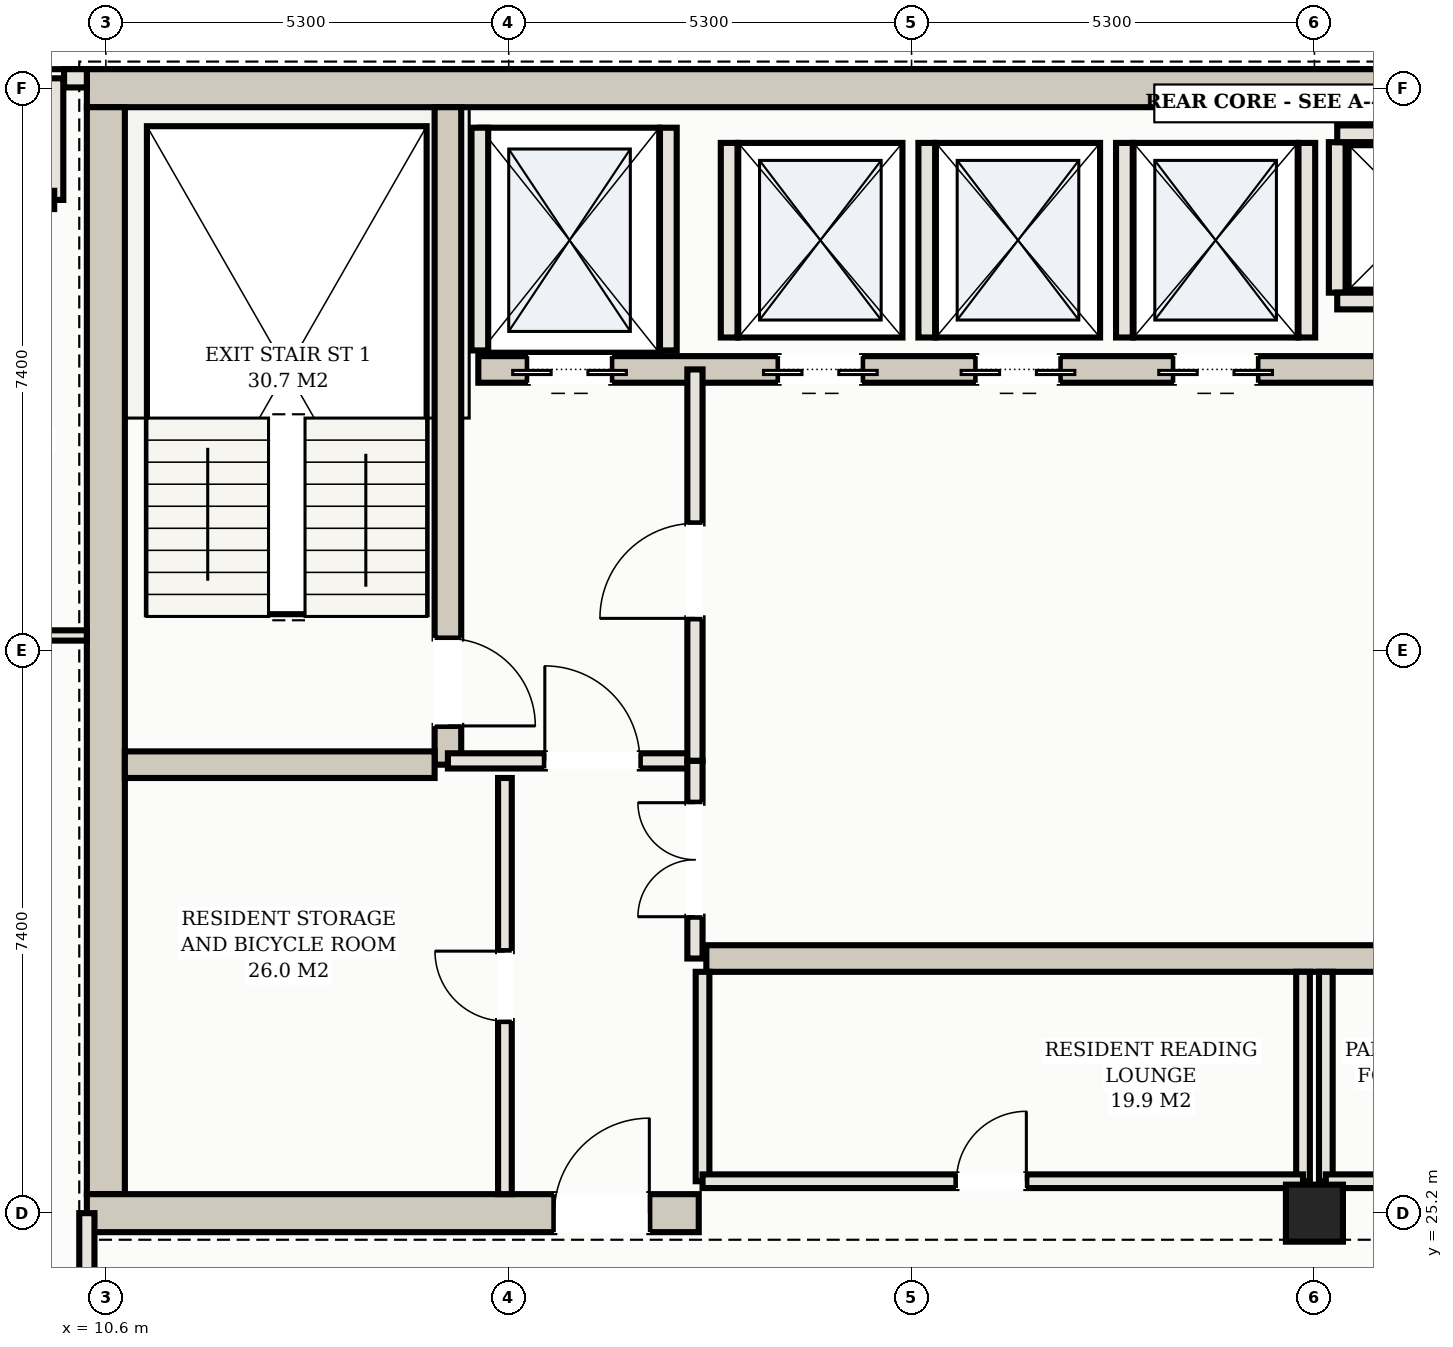
"""IFC4 building model, lengths in metres.
Left out: names, types, materials, properties, quantities, classifications, styles, units other than length and angle.
Written with IfcOpenShell. Run it as: python <this file> out.ifc"""

import sys

from ifc_helpers import new_model, si_unit, direction, frame, frame_2d, origin, origin_2d, place, context, subcontext, project, spatial, rectangle, hollow_rectangle, extrude, element, fill, save


model = new_model("IFC4")
c1 = context("Model", 3, precision=1e-05, world=origin(), true_north=direction((0.0, 1.0)))
c2 = subcontext(c1, "Body", "Model", "MODEL_VIEW")
j1 = project(units=[si_unit("LENGTHUNIT", "METRE"), si_unit("PLANEANGLEUNIT", "RADIAN")], contexts=[c1])
p1 = place(None, origin())
s1 = spatial("IfcSite", under=j1, at=p1, CompositionType="ELEMENT")
p2 = place(p1, origin())
s2 = spatial("IfcBuilding", under=s1, at=p2, CompositionType="ELEMENT")
p3 = place(p2, frame((0.0, 0.0, 223.1)))
s3 = spatial("IfcBuildingStorey", under=s2, at=p3, CompositionType="ELEMENT", Elevation=223.1)
p4 = place(p3, frame((10.35, 40.0, 0.0), z_axis=(0.0, 0.0, 1.0), x_axis=(1.0, 0.0, 0.0)))
e1 = element("IfcWall", 1, at=p4, inside=s3, PredefinedType="SHEAR", context=c2, shape_type="SweptSolid", body=[
    extrude(rectangle(XDim=32.3, YDim=0.5, at=frame_2d((16.15, 0.0))), origin(), (0.0, 0.0, 1.0), 3.11),
])
p5 = place(p3, frame((10.6, 25.45, 0.0), z_axis=(0.0, 0.0, 1.0), x_axis=(0.0, 1.0, 0.0)))
e2 = element("IfcWall", 2, at=p5, inside=s3, PredefinedType="SHEAR", context=c2, shape_type="SweptSolid", body=[
    extrude(rectangle(XDim=14.3, YDim=0.5, at=frame_2d((7.15, 0.0))), origin(), (0.0, 0.0, 1.0), 3.11),
])
p6 = place(p3, frame((10.35, 25.2, 0.0), z_axis=(0.0, 0.0, 1.0), x_axis=(1.0, 0.0, 0.0)))
e3 = element("IfcWall", 3, at=p6, inside=s3, PredefinedType="SHEAR", context=c2, shape_type="SweptSolid", body=[
    extrude(rectangle(XDim=8.05, YDim=0.5, at=frame_2d((4.025, 0.0))), origin(), (0.0, 0.0, 1.0), 3.11),
])
p7 = place(p6, frame((6.15, 0.0, 0.0)))
e4 = element("IfcOpeningElement", 4, at=p7, cuts=e3, PredefinedType="OPENING", context=c2, shape_type="SweptSolid", body=[
    extrude(rectangle(XDim=1.25, YDim=2.2, at=frame_2d((0.625, 1.1))), frame((0.0, 0.26, 0.0), z_axis=(0.0, -1.0, 0.0), x_axis=(1.0, 0.0, 0.0)), (0.0, 0.0, 1.0), 0.52),
])
p8 = place(p3, frame((15.1, 31.1, 0.0), z_axis=(0.0, 0.0, 1.0), x_axis=(0.0, 1.0, 0.0)))
e5 = element("IfcWall", 5, at=p8, inside=s3, PredefinedType="SHEAR", context=c2, shape_type="SweptSolid", body=[
    extrude(rectangle(XDim=8.65, YDim=0.35, at=frame_2d((4.325, 0.0))), origin(), (0.0, 0.0, 1.0), 3.11),
])
p9 = place(p8, frame((0.51, 0.0, 0.0)))
e6 = element("IfcOpeningElement", 6, at=p9, cuts=e5, PredefinedType="OPENING", context=c2, shape_type="SweptSolid", body=[
    extrude(rectangle(XDim=1.15, YDim=2.2, at=frame_2d((0.575, 1.1))), frame((0.0, 0.185, 0.0), z_axis=(0.0, -1.0, 0.0), x_axis=(1.0, 0.0, 0.0)), (0.0, 0.0, 1.0), 0.37),
])
p10 = place(p3, frame((10.85, 31.1, 0.0), z_axis=(0.0, 0.0, 1.0), x_axis=(1.0, 0.0, 0.0)))
e7 = element("IfcWall", 7, at=p10, inside=s3, PredefinedType="SHEAR", context=c2, shape_type="SweptSolid", body=[
    extrude(rectangle(XDim=4.075, YDim=0.35, at=frame_2d((2.038, 0.0))), origin(), (0.0, 0.0, 1.0), 3.11),
])
p11 = place(p3, frame((15.5, 36.3, 0.0), z_axis=(0.0, 0.0, 1.0), x_axis=(1.0, 0.0, 0.0)))
e8 = element("IfcWall", 8, at=p11, inside=s3, PredefinedType="SHEAR", context=c2, shape_type="SweptSolid", body=[
    extrude(rectangle(XDim=22.0, YDim=0.35, at=frame_2d((11.0, 0.0))), origin(), (0.0, 0.0, 1.0), 3.11),
])
p12 = place(p11, frame((0.65, 0.0, 0.0)))
e9 = element("IfcOpeningElement", 9, at=p12, cuts=e8, PredefinedType="OPENING", context=c2, shape_type="SweptSolid", body=[
    extrude(rectangle(XDim=1.1, YDim=2.15, at=frame_2d((0.55, 1.075))), frame((0.0, 0.185, 0.0), z_axis=(0.0, -1.0, 0.0), x_axis=(1.0, 0.0, 0.0)), (0.0, 0.0, 1.0), 0.37),
])
p13 = place(p11, frame((20.25, 0.0, 0.0)))
e10 = element("IfcOpeningElement", 10, at=p13, cuts=e8, PredefinedType="OPENING", context=c2, shape_type="SweptSolid", body=[
    extrude(rectangle(XDim=1.1, YDim=2.15, at=frame_2d((0.55, 1.075))), frame((0.0, 0.185, 0.0), z_axis=(0.0, -1.0, 0.0), x_axis=(1.0, 0.0, 0.0)), (0.0, 0.0, 1.0), 0.37),
])
p14 = place(p11, frame((17.05, 0.0, 0.0)))
e11 = element("IfcOpeningElement", 11, at=p14, cuts=e8, PredefinedType="OPENING", context=c2, shape_type="SweptSolid", body=[
    extrude(rectangle(XDim=1.3, YDim=2.2, at=frame_2d((0.65, 1.1))), frame((0.0, 0.185, 0.0), z_axis=(0.0, -1.0, 0.0), x_axis=(1.0, 0.0, 0.0)), (0.0, 0.0, 1.0), 0.37),
])
p15 = place(p11, frame((3.95, 0.0, 0.0)))
e12 = element("IfcOpeningElement", 12, at=p15, cuts=e8, PredefinedType="OPENING", context=c2, shape_type="SweptSolid", body=[
    extrude(rectangle(XDim=1.1, YDim=2.15, at=frame_2d((0.55, 1.075))), frame((0.0, 0.185, 0.0), z_axis=(0.0, -1.0, 0.0), x_axis=(1.0, 0.0, 0.0)), (0.0, 0.0, 1.0), 0.37),
])
p16 = place(p11, frame((6.55, 0.0, 0.0)))
e13 = element("IfcOpeningElement", 13, at=p16, cuts=e8, PredefinedType="OPENING", context=c2, shape_type="SweptSolid", body=[
    extrude(rectangle(XDim=1.1, YDim=2.15, at=frame_2d((0.55, 1.075))), frame((0.0, 0.185, 0.0), z_axis=(0.0, -1.0, 0.0), x_axis=(1.0, 0.0, 0.0)), (0.0, 0.0, 1.0), 0.37),
])
p17 = place(p11, frame((9.15, 0.0, 0.0)))
e14 = element("IfcOpeningElement", 14, at=p17, cuts=e8, PredefinedType="OPENING", context=c2, shape_type="SweptSolid", body=[
    extrude(rectangle(XDim=1.1, YDim=2.15, at=frame_2d((0.55, 1.075))), frame((0.0, 0.185, 0.0), z_axis=(0.0, -1.0, 0.0), x_axis=(1.0, 0.0, 0.0)), (0.0, 0.0, 1.0), 0.37),
])
p18 = place(p3, frame((18.5, 28.55, 0.0), z_axis=(0.0, 0.0, 1.0), x_axis=(1.0, 0.0, 0.0)))
e15 = element("IfcWall", 15, at=p18, inside=s3, PredefinedType="SHEAR", context=c2, shape_type="SweptSolid", body=[
    extrude(rectangle(XDim=16.0, YDim=0.35, at=frame_2d((8.0, 0.0))), origin(), (0.0, 0.0, 1.0), 3.11),
])
p19 = place(p3, frame((26.5, 25.2, 0.0), z_axis=(0.0, 0.0, 1.0), x_axis=(1.0, 0.0, 0.0)))
e16 = element("IfcColumn", 16, at=p19, inside=s3, PredefinedType="COLUMN", context=c2, shape_type="SweptSolid", body=[
    extrude(hollow_rectangle(XDim=0.75, YDim=0.75, WallThickness=0.025, at=origin_2d()), origin(), (0.0, 0.0, 1.0), 3.3),
])
for number, where, z_axis, x_axis in (
    (17, (15.52, 36.55, 0.0), (0.0, 0.0, 1.0), (0.0, 1.0, 0.0)),
    (18, (18.0, 36.55, 0.0), (0.0, 0.0, 1.0), (0.0, 1.0, 0.0)),
):
    element("IfcWall", number, at=place(p3, frame(where, z_axis=z_axis, x_axis=x_axis)), inside=s3, PredefinedType="SOLIDWALL", context=c2, shape_type="SweptSolid", body=[
        extrude(rectangle(XDim=2.93, YDim=0.22, at=frame_2d((1.465, 0.0))), origin(), (0.0, 0.0, 1.0), 3.11),
    ])
for number, where, z_axis, x_axis in (
    (19, (18.8, 36.72, 0.0), (0.0, 0.0, 1.0), (0.0, 1.0, 0.0)),
    (20, (21.4, 36.72, 0.0), (0.0, 0.0, 1.0), (0.0, 1.0, 0.0)),
    (21, (24.0, 36.72, 0.0), (0.0, 0.0, 1.0), (0.0, 1.0, 0.0)),
    (22, (26.4, 36.72, 0.0), (0.0, 0.0, 1.0), (0.0, 1.0, 0.0)),
):
    element("IfcWall", number, at=place(p3, frame(where, z_axis=z_axis, x_axis=x_axis)), inside=s3, PredefinedType="SOLIDWALL", context=c2, shape_type="SweptSolid", body=[
        extrude(rectangle(XDim=2.56, YDim=0.22, at=frame_2d((1.28, 0.0))), origin(), (0.0, 0.0, 1.0), 3.11),
    ])
p20 = place(p3, frame((26.8, 37.31, 0.0), z_axis=(0.0, 0.0, 1.0), x_axis=(0.0, 1.0, 0.0)))
e23 = element("IfcWall", 23, at=p20, inside=s3, PredefinedType="SOLIDWALL", context=c2, shape_type="SweptSolid", body=[
    extrude(rectangle(XDim=1.98, YDim=0.22, at=frame_2d((0.99, 0.0))), origin(), (0.0, 0.0, 1.0), 3.11),
])
for number, where, z_axis, x_axis in (
    (24, (26.8, 39.4, 0.0), (0.0, 0.0, 1.0), (1.0, 0.0, 0.0)),
    (25, (26.8, 37.2, 0.0), (0.0, 0.0, 1.0), (1.0, 0.0, 0.0)),
):
    element("IfcWall", number, at=place(p3, frame(where, z_axis=z_axis, x_axis=x_axis)), inside=s3, PredefinedType="SOLIDWALL", context=c2, shape_type="SweptSolid", body=[
        extrude(rectangle(XDim=2.2, YDim=0.22, at=frame_2d((1.1, 0.0))), origin(), (0.0, 0.0, 1.0), 3.11),
    ])
p21 = place(p3, frame((10.35, 40.13, 0.0), z_axis=(0.0, 0.0, 1.0), x_axis=(-1.0, 0.0, 0.0)))
e26 = element("IfcWall", 26, at=p21, inside=s3, PredefinedType="SOLIDWALL", context=c2, shape_type="SweptSolid", body=[
    extrude(rectangle(XDim=0.3, YDim=0.24, at=frame_2d((0.15, 0.0))), origin(), (0.0, 0.0, 1.0), 3.11),
])
for number, where, z_axis, x_axis in (
    (27, (9.92, 40.13, 0.0), (0.0, 0.0, 1.0), (0.0, -1.0, 0.0)),
    (28, (9.92, 38.53, 0.0), (0.0, 0.0, 1.0), (-1.0, 0.0, 0.0)),
):
    element("IfcWall", number, at=place(p3, frame(where, z_axis=z_axis, x_axis=x_axis)), inside=s3, PredefinedType="SOLIDWALL", context=c2, shape_type="SweptSolid", body=[
        extrude(rectangle(XDim=1.6, YDim=0.24, at=frame_2d((0.8, 0.0))), origin(), (0.0, 0.0, 1.0), 3.11),
    ])
p22 = place(p3, frame((15.1, 31.15, 0.0), z_axis=(0.0, 0.0, 1.0), x_axis=(1.0, 0.0, 0.0)))
e29 = element("IfcWall", 29, at=p22, inside=s3, PredefinedType="PARTITIONING", context=c2, shape_type="SweptSolid", body=[
    extrude(rectangle(XDim=3.25, YDim=0.2, at=frame_2d((1.625, 0.0))), origin(), (0.0, 0.0, 1.0), 2.43),
])
p23 = place(p22, frame((1.275, 0.0, 0.0)))
e30 = element("IfcOpeningElement", 30, at=p23, cuts=e29, PredefinedType="OPENING", context=c2, shape_type="SweptSolid", body=[
    extrude(rectangle(XDim=1.25, YDim=2.2, at=frame_2d((0.625, 1.1))), frame((0.0, 0.11, 0.0), z_axis=(0.0, -1.0, 0.0), x_axis=(1.0, 0.0, 0.0)), (0.0, 0.0, 1.0), 0.22),
])
p24 = place(p3, frame((18.35, 31.15, 0.0), z_axis=(0.0, 0.0, 1.0), x_axis=(0.0, 1.0, 0.0)))
e31 = element("IfcWall", 31, at=p24, inside=s3, PredefinedType="PARTITIONING", context=c2, shape_type="SweptSolid", body=[
    extrude(rectangle(XDim=5.15, YDim=0.2, at=frame_2d((2.575, 0.0))), origin(), (0.0, 0.0, 1.0), 2.43),
])
p25 = place(p24, frame((1.875, 0.0, 0.0)))
e32 = element("IfcOpeningElement", 32, at=p25, cuts=e31, PredefinedType="OPENING", context=c2, shape_type="SweptSolid", body=[
    extrude(rectangle(XDim=1.25, YDim=2.2, at=frame_2d((0.625, 1.1))), frame((0.0, 0.11, 0.0), z_axis=(0.0, -1.0, 0.0), x_axis=(1.0, 0.0, 0.0)), (0.0, 0.0, 1.0), 0.22),
])
p26 = place(p3, frame((15.85, 25.45, 0.0), z_axis=(0.0, 0.0, 1.0), x_axis=(0.0, 1.0, 0.0)))
e33 = element("IfcWall", 33, at=p26, inside=s3, PredefinedType="PARTITIONING", context=c2, shape_type="SweptSolid", body=[
    extrude(rectangle(XDim=5.475, YDim=0.18, at=frame_2d((2.738, 0.0))), origin(), (0.0, 0.0, 1.0), 2.43),
])
p27 = place(p26, frame((2.277, 0.0, 0.0)))
e34 = element("IfcOpeningElement", 34, at=p27, cuts=e33, PredefinedType="OPENING", context=c2, shape_type="SweptSolid", body=[
    extrude(rectangle(XDim=0.92, YDim=2.15, at=frame_2d((0.46, 1.075))), frame((0.0, 0.1, 0.0), z_axis=(0.0, -1.0, 0.0), x_axis=(1.0, 0.0, 0.0)), (0.0, 0.0, 1.0), 0.2),
])
p28 = place(p3, frame((18.35, 28.55, 0.0), z_axis=(0.0, 0.0, 1.0), x_axis=(0.0, 1.0, 0.0)))
e35 = element("IfcWall", 35, at=p28, inside=s3, PredefinedType="PARTITIONING", context=c2, shape_type="SweptSolid", body=[
    extrude(rectangle(XDim=2.6, YDim=0.2, at=frame_2d((1.3, 0.0))), origin(), (0.0, 0.0, 1.0), 2.43),
])
p29 = place(p28, frame((0.55, 0.0, 0.0)))
e36 = element("IfcOpeningElement", 36, at=p29, cuts=e35, PredefinedType="OPENING", context=c2, shape_type="SweptSolid", body=[
    extrude(rectangle(XDim=1.5, YDim=2.25, at=frame_2d((0.75, 1.125))), frame((0.0, 0.11, 0.0), z_axis=(0.0, -1.0, 0.0), x_axis=(1.0, 0.0, 0.0)), (0.0, 0.0, 1.0), 0.22),
])
for number, where, z_axis, x_axis in (
    (37, (18.45, 25.62, 0.0), (0.0, 0.0, 1.0), (0.0, 1.0, 0.0)),
    (38, (26.35, 25.62, 0.0), (0.0, 0.0, 1.0), (0.0, 1.0, 0.0)),
):
    element("IfcWall", number, at=place(p3, frame(where, z_axis=z_axis, x_axis=x_axis)), inside=s3, PredefinedType="PARTITIONING", context=c2, shape_type="SweptSolid", body=[
        extrude(rectangle(XDim=2.755, YDim=0.18, at=frame_2d((1.377, 0.0))), origin(), (0.0, 0.0, 1.0), 2.43),
    ])
p30 = place(p3, frame((18.45, 25.62, 0.0), z_axis=(0.0, 0.0, 1.0), x_axis=(1.0, 0.0, 0.0)))
e39 = element("IfcWall", 39, at=p30, inside=s3, PredefinedType="PARTITIONING", context=c2, shape_type="SweptSolid", body=[
    extrude(rectangle(XDim=7.9, YDim=0.18, at=frame_2d((3.95, 0.0))), origin(), (0.0, 0.0, 1.0), 2.43),
])
p31 = place(p30, frame((3.34, 0.0, 0.0)))
e40 = element("IfcOpeningElement", 40, at=p31, cuts=e39, PredefinedType="OPENING", context=c2, shape_type="SweptSolid", body=[
    extrude(rectangle(XDim=0.92, YDim=2.15, at=frame_2d((0.46, 1.075))), frame((0.0, 0.1, 0.0), z_axis=(0.0, -1.0, 0.0), x_axis=(1.0, 0.0, 0.0)), (0.0, 0.0, 1.0), 0.2),
])
p32 = place(p3, frame((26.65, 25.62, 0.0), z_axis=(0.0, 0.0, 1.0), x_axis=(0.0, 1.0, 0.0)))
e41 = element("IfcWall", 41, at=p32, inside=s3, PredefinedType="PARTITIONING", context=c2, shape_type="SweptSolid", body=[
    extrude(rectangle(XDim=2.755, YDim=0.18, at=frame_2d((1.377, 0.0))), origin(), (0.0, 0.0, 1.0), 2.43),
])
p33 = place(p3, frame((26.65, 25.62, 0.0), z_axis=(0.0, 0.0, 1.0), x_axis=(1.0, 0.0, 0.0)))
e42 = element("IfcWall", 42, at=p33, inside=s3, PredefinedType="PARTITIONING", context=c2, shape_type="SweptSolid", body=[
    extrude(rectangle(XDim=7.9, YDim=0.18, at=frame_2d((3.95, 0.0))), origin(), (0.0, 0.0, 1.0), 2.43),
])
p34 = place(p33, frame((3.34, 0.0, 0.0)))
e43 = element("IfcOpeningElement", 43, at=p34, cuts=e42, PredefinedType="OPENING", context=c2, shape_type="SweptSolid", body=[
    extrude(rectangle(XDim=0.92, YDim=2.15, at=frame_2d((0.46, 1.075))), frame((0.0, 0.1, 0.0), z_axis=(0.0, -1.0, 0.0), x_axis=(1.0, 0.0, 0.0)), (0.0, 0.0, 1.0), 0.2),
])
p35 = place(p3, frame((10.35, 23.75, 0.0), z_axis=(0.0, 0.0, 1.0), x_axis=(0.0, 1.0, 0.0)))
e44 = element("IfcWall", 44, at=p35, inside=s3, PredefinedType="PARTITIONING", context=c2, shape_type="SweptSolid", body=[
    extrude(rectangle(XDim=1.45, YDim=0.2, at=frame_2d((0.725, 0.0))), origin(), (0.0, 0.0, 1.0), 2.43),
])
p36 = place(p3, frame((6.72, 32.8, 0.0), z_axis=(0.0, 0.0, 1.0), x_axis=(1.0, 0.0, 0.0)))
e45 = element("IfcWall", 45, at=p36, inside=s3, PredefinedType="PARTITIONING", context=c2, shape_type="SweptSolid", body=[
    extrude(rectangle(XDim=3.63, YDim=0.135, at=frame_2d((1.815, 0.0))), origin(), (0.0, 0.0, 1.0), 2.43),
])
p37 = place(p36, frame((1.355, 0.0, 0.0)))
e46 = element("IfcOpeningElement", 46, at=p37, cuts=e45, PredefinedType="OPENING", context=c2, shape_type="SweptSolid", body=[
    extrude(rectangle(XDim=0.92, YDim=2.15, at=frame_2d((0.46, 1.075))), frame((0.0, 0.078, 0.0), z_axis=(0.0, -1.0, 0.0), x_axis=(1.0, 0.0, 0.0)), (0.0, 0.0, 1.0), 0.155),
])
p38 = place(p12, frame((1.1, 0.0, 0.0), z_axis=(0.0, 0.0, 1.0), x_axis=(-1.0, 0.0, 0.0)))
e47 = element("IfcDoor", 47, at=p38, inside=s3, OperationType="DOUBLE_DOOR_SLIDING", PredefinedType="DOOR", context=c2, shape_type="SweptSolid", body=[
    extrude(rectangle(XDim=1.1, YDim=2.15, at=frame_2d((0.55, 1.075))), frame((0.0, 0.025, 0.0), z_axis=(0.0, -1.0, 0.0), x_axis=(1.0, 0.0, 0.0)), (0.0, 0.0, 1.0), 0.05),
])
fill(e9, e47)
p39 = place(p15, frame((1.1, 0.0, 0.0), z_axis=(0.0, 0.0, 1.0), x_axis=(-1.0, 0.0, 0.0)))
e48 = element("IfcDoor", 48, at=p39, inside=s3, OperationType="DOUBLE_DOOR_SLIDING", PredefinedType="DOOR", context=c2, shape_type="SweptSolid", body=[
    extrude(rectangle(XDim=1.1, YDim=2.15, at=frame_2d((0.55, 1.075))), frame((0.0, 0.025, 0.0), z_axis=(0.0, -1.0, 0.0), x_axis=(1.0, 0.0, 0.0)), (0.0, 0.0, 1.0), 0.05),
])
fill(e12, e48)
p40 = place(p16, frame((1.1, 0.0, 0.0), z_axis=(0.0, 0.0, 1.0), x_axis=(-1.0, 0.0, 0.0)))
e49 = element("IfcDoor", 49, at=p40, inside=s3, OperationType="DOUBLE_DOOR_SLIDING", PredefinedType="DOOR", context=c2, shape_type="SweptSolid", body=[
    extrude(rectangle(XDim=1.1, YDim=2.15, at=frame_2d((0.55, 1.075))), frame((0.0, 0.025, 0.0), z_axis=(0.0, -1.0, 0.0), x_axis=(1.0, 0.0, 0.0)), (0.0, 0.0, 1.0), 0.05),
])
fill(e13, e49)
p41 = place(p17, frame((1.1, 0.0, 0.0), z_axis=(0.0, 0.0, 1.0), x_axis=(-1.0, 0.0, 0.0)))
e50 = element("IfcDoor", 50, at=p41, inside=s3, OperationType="DOUBLE_DOOR_SLIDING", PredefinedType="DOOR", context=c2, shape_type="SweptSolid", body=[
    extrude(rectangle(XDim=1.1, YDim=2.15, at=frame_2d((0.55, 1.075))), frame((0.0, 0.025, 0.0), z_axis=(0.0, -1.0, 0.0), x_axis=(1.0, 0.0, 0.0)), (0.0, 0.0, 1.0), 0.05),
])
fill(e14, e50)
p42 = place(p7, origin())
e51 = element("IfcDoor", 51, at=p42, inside=s3, OperationType="SINGLE_SWING_RIGHT", PredefinedType="DOOR", context=c2, shape_type="SweptSolid", body=[
    extrude(rectangle(XDim=1.25, YDim=2.2, at=frame_2d((0.625, 1.1))), frame((0.0, 0.025, 0.0), z_axis=(0.0, -1.0, 0.0), x_axis=(1.0, 0.0, 0.0)), (0.0, 0.0, 1.0), 0.05),
])
fill(e4, e51)
p43 = place(p23, origin())
e52 = element("IfcDoor", 52, at=p43, inside=s3, OperationType="SINGLE_SWING_LEFT", PredefinedType="DOOR", context=c2, shape_type="SweptSolid", body=[
    extrude(rectangle(XDim=1.25, YDim=2.2, at=frame_2d((0.625, 1.1))), frame((0.0, 0.025, 0.0), z_axis=(0.0, -1.0, 0.0), x_axis=(1.0, 0.0, 0.0)), (0.0, 0.0, 1.0), 0.05),
])
fill(e30, e52)
p44 = place(p25, origin())
e53 = element("IfcDoor", 53, at=p44, inside=s3, OperationType="SINGLE_SWING_LEFT", PredefinedType="DOOR", context=c2, shape_type="SweptSolid", body=[
    extrude(rectangle(XDim=1.25, YDim=2.2, at=frame_2d((0.625, 1.1))), frame((0.0, 0.025, 0.0), z_axis=(0.0, -1.0, 0.0), x_axis=(1.0, 0.0, 0.0)), (0.0, 0.0, 1.0), 0.05),
])
fill(e32, e53)
p45 = place(p9, frame((1.15, 0.0, 0.0), z_axis=(0.0, 0.0, 1.0), x_axis=(-1.0, 0.0, 0.0)))
e54 = element("IfcDoor", 54, at=p45, inside=s3, OperationType="SINGLE_SWING_RIGHT", PredefinedType="DOOR", context=c2, shape_type="SweptSolid", body=[
    extrude(rectangle(XDim=1.15, YDim=2.2, at=frame_2d((0.575, 1.1))), frame((0.0, 0.025, 0.0), z_axis=(0.0, -1.0, 0.0), x_axis=(1.0, 0.0, 0.0)), (0.0, 0.0, 1.0), 0.05),
])
fill(e6, e54)
p46 = place(p27, origin())
e55 = element("IfcDoor", 55, at=p46, inside=s3, OperationType="SINGLE_SWING_RIGHT", PredefinedType="DOOR", context=c2, shape_type="SweptSolid", body=[
    extrude(rectangle(XDim=0.92, YDim=2.15, at=frame_2d((0.46, 1.075))), frame((0.0, 0.025, 0.0), z_axis=(0.0, -1.0, 0.0), x_axis=(1.0, 0.0, 0.0)), (0.0, 0.0, 1.0), 0.05),
])
fill(e34, e55)
p47 = place(p29, origin())
e56 = element("IfcDoor", 56, at=p47, inside=s3, OperationType="DOUBLE_DOOR_SINGLE_SWING", PredefinedType="DOOR", context=c2, shape_type="SweptSolid", body=[
    extrude(rectangle(XDim=1.5, YDim=2.25, at=frame_2d((0.75, 1.125))), frame((0.0, 0.025, 0.0), z_axis=(0.0, -1.0, 0.0), x_axis=(1.0, 0.0, 0.0)), (0.0, 0.0, 1.0), 0.05),
])
fill(e36, e56)
p48 = place(p31, origin())
e57 = element("IfcDoor", 57, at=p48, inside=s3, OperationType="SINGLE_SWING_RIGHT", PredefinedType="DOOR", context=c2, shape_type="SweptSolid", body=[
    extrude(rectangle(XDim=0.92, YDim=2.15, at=frame_2d((0.46, 1.075))), frame((0.0, 0.025, 0.0), z_axis=(0.0, -1.0, 0.0), x_axis=(1.0, 0.0, 0.0)), (0.0, 0.0, 1.0), 0.05),
])
fill(e40, e57)
save(model, sys.argv[1])
